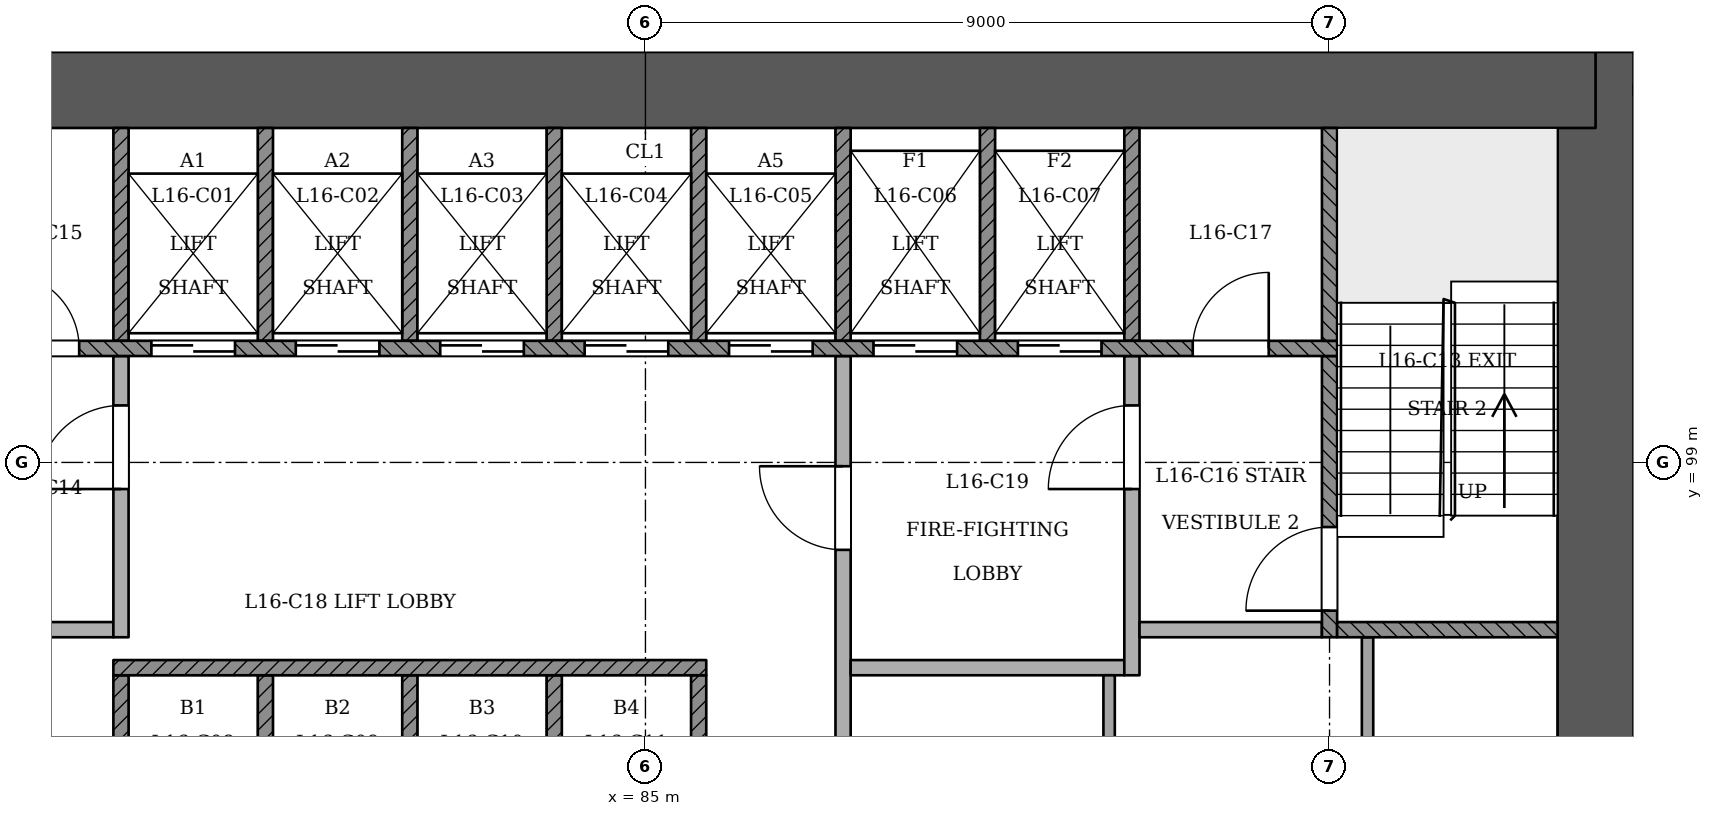
"""IFC4 building model, lengths in metres.
Left out: names, types, materials, properties, quantities, classifications, styles, units other than length and angle.
Written with IfcOpenShell. Run it as: python <this file> out.ifc"""

import sys

from ifc_helpers import new_model, si_unit, direction, frame, frame_2d, origin, place, context, subcontext, project, spatial, rectangle, extrude, element, fill, save


model = new_model("IFC4")
c1 = context("Model", 3, precision=1e-05, world=origin(), true_north=direction((0.0, 1.0)))
c2 = subcontext(c1, "Body", "Model", "MODEL_VIEW")
j1 = project(units=[si_unit("LENGTHUNIT", "METRE"), si_unit("PLANEANGLEUNIT", "RADIAN")], contexts=[c1])
p1 = place(None, origin())
s1 = spatial("IfcSite", under=j1, at=p1, CompositionType="ELEMENT")
p2 = place(p1, origin())
s2 = spatial("IfcBuilding", under=s1, at=p2, CompositionType="ELEMENT")
p3 = place(p2, frame((0.0, 0.0, 66.6)))
s3 = spatial("IfcBuildingStorey", under=s2, at=p3, CompositionType="ELEMENT", Elevation=66.6)
p4 = place(p3, frame((97.5, 92.9, 0.0), z_axis=(0.0, 0.0, 1.0), x_axis=(0.0, 1.0, 0.0)))
e1 = element("IfcWall", 1, at=p4, inside=s3, PredefinedType="SHEAR", context=c2, shape_type="SweptSolid", body=[
    extrude(rectangle(XDim=11.5, YDim=1.0, at=frame_2d((5.75, 0.0))), origin(), (0.0, 0.0, 1.0), 3.6),
])
p5 = place(p3, frame((97.5, 103.9, 0.0), z_axis=(0.0, 0.0, 1.0), x_axis=(-1.0, 0.0, 0.0)))
e2 = element("IfcWall", 2, at=p5, inside=s3, PredefinedType="SHEAR", context=c2, shape_type="SweptSolid", body=[
    extrude(rectangle(XDim=25.5, YDim=1.0, at=frame_2d((12.75, 0.0))), origin(), (0.0, 0.0, 1.0), 3.6),
])
p6 = place(p3, frame((62.458, 97.093, 0.0), z_axis=(0.0, 0.0, 1.0), x_axis=(0.499998802074, -0.866026095406, 0.0)))
e3 = element("IfcWall", 3, at=p6, inside=s3, PredefinedType="PARTITIONING", context=c2, shape_type="SweptSolid", body=[
    extrude(rectangle(XDim=43.437, YDim=0.15, at=frame_2d((21.719, 0.0))), origin(), (0.0, 0.0, 1.0), 2.7),
])
p7 = place(p6, frame((0.286, 0.0, 0.0)))
e4 = element("IfcOpeningElement", 4, at=p7, cuts=e3, PredefinedType="OPENING", context=c2, shape_type="SweptSolid", body=[
    extrude(rectangle(XDim=1.2, YDim=2.1, at=frame_2d((0.6, 1.05))), frame((0.0, 0.085, 0.0), z_axis=(0.0, -1.0, 0.0), x_axis=(1.0, 0.0, 0.0)), (0.0, 0.0, 1.0), 0.171),
])
p8 = place(p6, frame((12.13, 0.0, 0.0)))
e5 = element("IfcOpeningElement", 5, at=p8, cuts=e3, PredefinedType="OPENING", context=c2, shape_type="SweptSolid", body=[
    extrude(rectangle(XDim=1.2, YDim=2.1, at=frame_2d((0.6, 1.05))), frame((0.0, 0.085, 0.0), z_axis=(0.0, -1.0, 0.0), x_axis=(1.0, 0.0, 0.0)), (0.0, 0.0, 1.0), 0.171),
])
p9 = place(p6, frame((18.98, 0.0, 0.0)))
e6 = element("IfcOpeningElement", 6, at=p9, cuts=e3, PredefinedType="OPENING", context=c2, shape_type="SweptSolid", body=[
    extrude(rectangle(XDim=1.0, YDim=2.1, at=frame_2d((0.5, 1.05))), frame((0.0, 0.085, 0.0), z_axis=(0.0, -1.0, 0.0), x_axis=(1.0, 0.0, 0.0)), (0.0, 0.0, 1.0), 0.171),
])
p10 = place(p6, frame((27.88, 0.0, 0.0)))
e7 = element("IfcOpeningElement", 7, at=p10, cuts=e3, PredefinedType="OPENING", context=c2, shape_type="SweptSolid", body=[
    extrude(rectangle(XDim=1.2, YDim=2.1, at=frame_2d((0.6, 1.05))), frame((0.0, 0.085, 0.0), z_axis=(0.0, -1.0, 0.0), x_axis=(1.0, 0.0, 0.0)), (0.0, 0.0, 1.0), 0.171),
])
p11 = place(p6, frame((38.745, 0.0, 0.0)))
e8 = element("IfcOpeningElement", 8, at=p11, cuts=e3, PredefinedType="OPENING", context=c2, shape_type="SweptSolid", body=[
    extrude(rectangle(XDim=1.2, YDim=2.1, at=frame_2d((0.6, 1.05))), frame((0.0, 0.085, 0.0), z_axis=(0.0, -1.0, 0.0), x_axis=(1.0, 0.0, 0.0)), (0.0, 0.0, 1.0), 0.171),
])
p12 = place(p3, frame((85.824, 59.475, 0.0), z_axis=(0.0, 0.0, 1.0), x_axis=(0.499998498473, 0.86602627069, 0.0)))
e9 = element("IfcWall", 9, at=p12, inside=s3, PredefinedType="PARTITIONING", context=c2, shape_type="SweptSolid", body=[
    extrude(rectangle(XDim=42.924, YDim=0.15, at=frame_2d((21.462, 0.0))), origin(), (0.0, 0.0, 1.0), 2.7),
])
p13 = place(p12, frame((3.492, 0.0, 0.0)))
e10 = element("IfcOpeningElement", 10, at=p13, cuts=e9, PredefinedType="OPENING", context=c2, shape_type="SweptSolid", body=[
    extrude(rectangle(XDim=1.2, YDim=2.1, at=frame_2d((0.6, 1.05))), frame((0.0, 0.085, 0.0), z_axis=(0.0, -1.0, 0.0), x_axis=(1.0, 0.0, 0.0)), (0.0, 0.0, 1.0), 0.171),
])
p14 = place(p12, frame((14.357, 0.0, 0.0)))
e11 = element("IfcOpeningElement", 11, at=p14, cuts=e9, PredefinedType="OPENING", context=c2, shape_type="SweptSolid", body=[
    extrude(rectangle(XDim=1.2, YDim=2.1, at=frame_2d((0.6, 1.05))), frame((0.0, 0.085, 0.0), z_axis=(0.0, -1.0, 0.0), x_axis=(1.0, 0.0, 0.0)), (0.0, 0.0, 1.0), 0.171),
])
p15 = place(p12, frame((27.857, 0.0, 0.0)))
e12 = element("IfcOpeningElement", 12, at=p15, cuts=e9, PredefinedType="OPENING", context=c2, shape_type="SweptSolid", body=[
    extrude(rectangle(XDim=1.2, YDim=2.1, at=frame_2d((0.6, 1.05))), frame((0.0, 0.085, 0.0), z_axis=(0.0, -1.0, 0.0), x_axis=(1.0, 0.0, 0.0)), (0.0, 0.0, 1.0), 0.171),
])
p16 = place(p12, frame((38.721, 0.0, 0.0)))
e13 = element("IfcOpeningElement", 13, at=p16, cuts=e9, PredefinedType="OPENING", context=c2, shape_type="SweptSolid", body=[
    extrude(rectangle(XDim=1.2, YDim=2.1, at=frame_2d((0.6, 1.05))), frame((0.0, 0.085, 0.0), z_axis=(0.0, -1.0, 0.0), x_axis=(1.0, 0.0, 0.0)), (0.0, 0.0, 1.0), 0.171),
])
for number, where, z_axis, x_axis in (
    (14, (78.1, 93.4, 0.0), (0.0, 0.0, 1.0), (0.0, 1.0, 0.0)),
    (15, (80.0, 93.4, 0.0), (0.0, 0.0, 1.0), (0.0, 1.0, 0.0)),
    (16, (81.9, 93.4, 0.0), (0.0, 0.0, 1.0), (0.0, 1.0, 0.0)),
    (17, (83.8, 93.4, 0.0), (0.0, 0.0, 1.0), (0.0, 1.0, 0.0)),
    (18, (85.7, 93.4, 0.0), (0.0, 0.0, 1.0), (0.0, 1.0, 0.0)),
):
    element("IfcWall", number, at=place(p3, frame(where, z_axis=z_axis, x_axis=x_axis)), inside=s3, PredefinedType="SOLIDWALL", context=c2, shape_type="SweptSolid", body=[
        extrude(rectangle(XDim=2.8, YDim=0.2, at=frame_2d((1.4, 0.0))), origin(), (0.0, 0.0, 1.0), 3.1),
    ])
p17 = place(p3, frame((87.6, 93.4, 0.0), z_axis=(0.0, 0.0, 1.0), x_axis=(0.0, 1.0, 0.0)))
e19 = element("IfcWall", 19, at=p17, inside=s3, PredefinedType="PARTITIONING", context=c2, shape_type="SweptSolid", body=[
    extrude(rectangle(XDim=7.0, YDim=0.2, at=frame_2d((3.5, 0.0))), origin(), (0.0, 0.0, 1.0), 3.1),
])
p18 = place(p17, frame((4.45, 0.0, 0.0)))
e20 = element("IfcOpeningElement", 20, at=p18, cuts=e19, PredefinedType="OPENING", context=c2, shape_type="SweptSolid", body=[
    extrude(rectangle(XDim=1.1, YDim=2.1, at=frame_2d((0.55, 1.05))), frame((0.0, 0.11, 0.0), z_axis=(0.0, -1.0, 0.0), x_axis=(1.0, 0.0, 0.0)), (0.0, 0.0, 1.0), 0.221),
])
p19 = place(p3, frame((91.1, 93.4, 0.0), z_axis=(0.0, 0.0, 1.0), x_axis=(0.0, 1.0, 0.0)))
e21 = element("IfcWall", 21, at=p19, inside=s3, PredefinedType="PARTITIONING", context=c2, shape_type="SweptSolid", body=[
    extrude(rectangle(XDim=2.8, YDim=0.15, at=frame_2d((1.4, 0.0))), origin(), (0.0, 0.0, 1.0), 3.1),
])
p20 = place(p3, frame((94.5, 93.4, 0.0), z_axis=(0.0, 0.0, 1.0), x_axis=(0.0, 1.0, 0.0)))
e22 = element("IfcWall", 22, at=p20, inside=s3, PredefinedType="PARTITIONING", context=c2, shape_type="SweptSolid", body=[
    extrude(rectangle(XDim=3.3, YDim=0.15, at=frame_2d((1.65, 0.0))), origin(), (0.0, 0.0, 1.0), 3.1),
])
p21 = place(p3, frame((78.0, 96.3, 0.0), z_axis=(0.0, 0.0, 1.0), x_axis=(1.0, 0.0, 0.0)))
e23 = element("IfcWall", 23, at=p21, inside=s3, PredefinedType="SOLIDWALL", context=c2, shape_type="SweptSolid", body=[
    extrude(rectangle(XDim=7.8, YDim=0.2, at=frame_2d((3.9, 0.0))), origin(), (0.0, 0.0, 1.0), 3.1),
])
p22 = place(p3, frame((87.7, 96.3, 0.0), z_axis=(0.0, 0.0, 1.0), x_axis=(1.0, 0.0, 0.0)))
e24 = element("IfcWall", 24, at=p22, inside=s3, PredefinedType="PARTITIONING", context=c2, shape_type="SweptSolid", body=[
    extrude(rectangle(XDim=3.6, YDim=0.2, at=frame_2d((1.8, 0.0))), origin(), (0.0, 0.0, 1.0), 3.1),
])
p23 = place(p3, frame((91.4, 96.2, 0.0), z_axis=(0.0, 0.0, 1.0), x_axis=(0.0, 1.0, 0.0)))
e25 = element("IfcWall", 25, at=p23, inside=s3, PredefinedType="PARTITIONING", context=c2, shape_type="SweptSolid", body=[
    extrude(rectangle(XDim=4.2, YDim=0.2, at=frame_2d((2.1, 0.0))), origin(), (0.0, 0.0, 1.0), 3.1),
])
p24 = place(p23, frame((2.45, 0.0, 0.0)))
e26 = element("IfcOpeningElement", 26, at=p24, cuts=e25, PredefinedType="OPENING", context=c2, shape_type="SweptSolid", body=[
    extrude(rectangle(XDim=1.1, YDim=2.1, at=frame_2d((0.55, 1.05))), frame((0.0, 0.11, 0.0), z_axis=(0.0, -1.0, 0.0), x_axis=(1.0, 0.0, 0.0)), (0.0, 0.0, 1.0), 0.221),
])
p25 = place(p3, frame((76.1, 96.8, 0.0), z_axis=(0.0, 0.0, 1.0), x_axis=(1.0, 0.0, 0.0)))
e27 = element("IfcWall", 27, at=p25, inside=s3, PredefinedType="PARTITIONING", context=c2, shape_type="SweptSolid", body=[
    extrude(rectangle(XDim=1.9, YDim=0.2, at=frame_2d((0.95, 0.0))), origin(), (0.0, 0.0, 1.0), 3.1),
])
p26 = place(p3, frame((78.1, 96.7, 0.0), z_axis=(0.0, 0.0, 1.0), x_axis=(0.0, 1.0, 0.0)))
e28 = element("IfcWall", 28, at=p26, inside=s3, PredefinedType="PARTITIONING", context=c2, shape_type="SweptSolid", body=[
    extrude(rectangle(XDim=3.7, YDim=0.2, at=frame_2d((1.85, 0.0))), origin(), (0.0, 0.0, 1.0), 3.1),
])
p27 = place(p26, frame((1.95, 0.0, 0.0)))
e29 = element("IfcOpeningElement", 29, at=p27, cuts=e28, PredefinedType="OPENING", context=c2, shape_type="SweptSolid", body=[
    extrude(rectangle(XDim=1.1, YDim=2.1, at=frame_2d((0.55, 1.05))), frame((0.0, 0.11, 0.0), z_axis=(0.0, -1.0, 0.0), x_axis=(1.0, 0.0, 0.0)), (0.0, 0.0, 1.0), 0.221),
])
p28 = place(p3, frame((91.5, 96.8, 0.0), z_axis=(0.0, 0.0, 1.0), x_axis=(1.0, 0.0, 0.0)))
e30 = element("IfcWall", 30, at=p28, inside=s3, PredefinedType="PARTITIONING", context=c2, shape_type="SweptSolid", body=[
    extrude(rectangle(XDim=2.4, YDim=0.2, at=frame_2d((1.2, 0.0))), origin(), (0.0, 0.0, 1.0), 3.1),
])
p29 = place(p3, frame((94.0, 96.7, 0.0), z_axis=(0.0, 0.0, 1.0), x_axis=(0.0, 1.0, 0.0)))
e31 = element("IfcWall", 31, at=p29, inside=s3, PredefinedType="SOLIDWALL", context=c2, shape_type="SweptSolid", body=[
    extrude(rectangle(XDim=3.7, YDim=0.2, at=frame_2d((1.85, 0.0))), origin(), (0.0, 0.0, 1.0), 3.1),
])
p30 = place(p29, frame((0.35, 0.0, 0.0)))
e32 = element("IfcOpeningElement", 32, at=p30, cuts=e31, PredefinedType="OPENING", context=c2, shape_type="SweptSolid", body=[
    extrude(rectangle(XDim=1.1, YDim=2.1, at=frame_2d((0.55, 1.05))), frame((0.0, 0.11, 0.0), z_axis=(0.0, -1.0, 0.0), x_axis=(1.0, 0.0, 0.0)), (0.0, 0.0, 1.0), 0.221),
])
p31 = place(p3, frame((94.1, 96.8, 0.0), z_axis=(0.0, 0.0, 1.0), x_axis=(1.0, 0.0, 0.0)))
e33 = element("IfcWall", 33, at=p31, inside=s3, PredefinedType="SOLIDWALL", context=c2, shape_type="SweptSolid", body=[
    extrude(rectangle(XDim=2.9, YDim=0.2, at=frame_2d((1.45, 0.0))), origin(), (0.0, 0.0, 1.0), 3.1),
])
p32 = place(p3, frame((75.9, 100.5, 0.0), z_axis=(0.0, 0.0, 1.0), x_axis=(1.0, 0.0, 0.0)))
e34 = element("IfcWall", 34, at=p32, inside=s3, PredefinedType="SOLIDWALL", context=c2, shape_type="SweptSolid", body=[
    extrude(rectangle(XDim=18.2, YDim=0.2, at=frame_2d((9.1, 0.0))), origin(), (0.0, 0.0, 1.0), 3.1),
])
p33 = place(p32, frame((2.6, 0.0, 0.0)))
e35 = element("IfcOpeningElement", 35, at=p33, cuts=e34, PredefinedType="OPENING", context=c2, shape_type="SweptSolid", body=[
    extrude(rectangle(XDim=1.1, YDim=2.1, at=frame_2d((0.55, 1.05))), frame((0.0, 0.11, 0.0), z_axis=(0.0, -1.0, 0.0), x_axis=(1.0, 0.0, 0.0)), (0.0, 0.0, 1.0), 0.221),
])
p34 = place(p32, frame((4.5, 0.0, 0.0)))
e36 = element("IfcOpeningElement", 36, at=p34, cuts=e34, PredefinedType="OPENING", context=c2, shape_type="SweptSolid", body=[
    extrude(rectangle(XDim=1.1, YDim=2.1, at=frame_2d((0.55, 1.05))), frame((0.0, 0.11, 0.0), z_axis=(0.0, -1.0, 0.0), x_axis=(1.0, 0.0, 0.0)), (0.0, 0.0, 1.0), 0.221),
])
p35 = place(p32, frame((6.4, 0.0, 0.0)))
e37 = element("IfcOpeningElement", 37, at=p35, cuts=e34, PredefinedType="OPENING", context=c2, shape_type="SweptSolid", body=[
    extrude(rectangle(XDim=1.1, YDim=2.1, at=frame_2d((0.55, 1.05))), frame((0.0, 0.11, 0.0), z_axis=(0.0, -1.0, 0.0), x_axis=(1.0, 0.0, 0.0)), (0.0, 0.0, 1.0), 0.221),
])
p36 = place(p32, frame((8.3, 0.0, 0.0)))
e38 = element("IfcOpeningElement", 38, at=p36, cuts=e34, PredefinedType="OPENING", context=c2, shape_type="SweptSolid", body=[
    extrude(rectangle(XDim=1.1, YDim=2.1, at=frame_2d((0.55, 1.05))), frame((0.0, 0.11, 0.0), z_axis=(0.0, -1.0, 0.0), x_axis=(1.0, 0.0, 0.0)), (0.0, 0.0, 1.0), 0.221),
])
p37 = place(p32, frame((10.2, 0.0, 0.0)))
e39 = element("IfcOpeningElement", 39, at=p37, cuts=e34, PredefinedType="OPENING", context=c2, shape_type="SweptSolid", body=[
    extrude(rectangle(XDim=1.1, YDim=2.1, at=frame_2d((0.55, 1.05))), frame((0.0, 0.11, 0.0), z_axis=(0.0, -1.0, 0.0), x_axis=(1.0, 0.0, 0.0)), (0.0, 0.0, 1.0), 0.221),
])
p38 = place(p32, frame((12.1, 0.0, 0.0)))
e40 = element("IfcOpeningElement", 40, at=p38, cuts=e34, PredefinedType="OPENING", context=c2, shape_type="SweptSolid", body=[
    extrude(rectangle(XDim=1.1, YDim=2.1, at=frame_2d((0.55, 1.05))), frame((0.0, 0.11, 0.0), z_axis=(0.0, -1.0, 0.0), x_axis=(1.0, 0.0, 0.0)), (0.0, 0.0, 1.0), 0.221),
])
p39 = place(p32, frame((14.0, 0.0, 0.0)))
e41 = element("IfcOpeningElement", 41, at=p39, cuts=e34, PredefinedType="OPENING", context=c2, shape_type="SweptSolid", body=[
    extrude(rectangle(XDim=1.1, YDim=2.1, at=frame_2d((0.55, 1.05))), frame((0.0, 0.11, 0.0), z_axis=(0.0, -1.0, 0.0), x_axis=(1.0, 0.0, 0.0)), (0.0, 0.0, 1.0), 0.221),
])
p40 = place(p32, frame((0.65, 0.0, 0.0)))
e42 = element("IfcOpeningElement", 42, at=p40, cuts=e34, PredefinedType="OPENING", context=c2, shape_type="SweptSolid", body=[
    extrude(rectangle(XDim=1.0, YDim=2.1, at=frame_2d((0.5, 1.05))), frame((0.0, 0.11, 0.0), z_axis=(0.0, -1.0, 0.0), x_axis=(1.0, 0.0, 0.0)), (0.0, 0.0, 1.0), 0.221),
])
p41 = place(p32, frame((16.3, 0.0, 0.0)))
e43 = element("IfcOpeningElement", 43, at=p41, cuts=e34, PredefinedType="OPENING", context=c2, shape_type="SweptSolid", body=[
    extrude(rectangle(XDim=1.0, YDim=2.1, at=frame_2d((0.5, 1.05))), frame((0.0, 0.11, 0.0), z_axis=(0.0, -1.0, 0.0), x_axis=(1.0, 0.0, 0.0)), (0.0, 0.0, 1.0), 0.221),
])
for number, where, z_axis, x_axis in (
    (44, (78.1, 100.6, 0.0), (0.0, 0.0, 1.0), (0.0, 1.0, 0.0)),
    (45, (80.0, 100.6, 0.0), (0.0, 0.0, 1.0), (0.0, 1.0, 0.0)),
    (46, (81.9, 100.6, 0.0), (0.0, 0.0, 1.0), (0.0, 1.0, 0.0)),
    (47, (83.8, 100.6, 0.0), (0.0, 0.0, 1.0), (0.0, 1.0, 0.0)),
    (48, (85.7, 100.6, 0.0), (0.0, 0.0, 1.0), (0.0, 1.0, 0.0)),
    (49, (87.6, 100.6, 0.0), (0.0, 0.0, 1.0), (0.0, 1.0, 0.0)),
    (50, (89.5, 100.6, 0.0), (0.0, 0.0, 1.0), (0.0, 1.0, 0.0)),
    (51, (91.4, 100.6, 0.0), (0.0, 0.0, 1.0), (0.0, 1.0, 0.0)),
    (52, (94.0, 100.6, 0.0), (0.0, 0.0, 1.0), (0.0, 1.0, 0.0)),
):
    element("IfcWall", number, at=place(p3, frame(where, z_axis=z_axis, x_axis=x_axis)), inside=s3, PredefinedType="SOLIDWALL", context=c2, shape_type="SweptSolid", body=[
        extrude(rectangle(XDim=2.8, YDim=0.2, at=frame_2d((1.4, 0.0))), origin(), (0.0, 0.0, 1.0), 3.1),
    ])
p42 = place(p33, origin())
e53 = element("IfcDoor", 53, at=p42, inside=s3, OperationType="SLIDING_TO_RIGHT", PredefinedType="NOTDEFINED", context=c2, shape_type="SweptSolid", body=[
    extrude(rectangle(XDim=1.1, YDim=2.1, at=frame_2d((0.55, 1.05))), frame((0.0, 0.025, 0.0), z_axis=(0.0, -1.0, 0.0), x_axis=(1.0, 0.0, 0.0)), (0.0, 0.0, 1.0), 0.05),
])
fill(e35, e53)
p43 = place(p34, origin())
e54 = element("IfcDoor", 54, at=p43, inside=s3, OperationType="SLIDING_TO_LEFT", PredefinedType="NOTDEFINED", context=c2, shape_type="SweptSolid", body=[
    extrude(rectangle(XDim=1.1, YDim=2.1, at=frame_2d((0.55, 1.05))), frame((0.0, 0.025, 0.0), z_axis=(0.0, -1.0, 0.0), x_axis=(1.0, 0.0, 0.0)), (0.0, 0.0, 1.0), 0.05),
])
fill(e36, e54)
p44 = place(p35, origin())
e55 = element("IfcDoor", 55, at=p44, inside=s3, OperationType="SLIDING_TO_RIGHT", PredefinedType="NOTDEFINED", context=c2, shape_type="SweptSolid", body=[
    extrude(rectangle(XDim=1.1, YDim=2.1, at=frame_2d((0.55, 1.05))), frame((0.0, 0.025, 0.0), z_axis=(0.0, -1.0, 0.0), x_axis=(1.0, 0.0, 0.0)), (0.0, 0.0, 1.0), 0.05),
])
fill(e37, e55)
p45 = place(p36, origin())
e56 = element("IfcDoor", 56, at=p45, inside=s3, OperationType="SLIDING_TO_LEFT", PredefinedType="NOTDEFINED", context=c2, shape_type="SweptSolid", body=[
    extrude(rectangle(XDim=1.1, YDim=2.1, at=frame_2d((0.55, 1.05))), frame((0.0, 0.025, 0.0), z_axis=(0.0, -1.0, 0.0), x_axis=(1.0, 0.0, 0.0)), (0.0, 0.0, 1.0), 0.05),
])
fill(e38, e56)
p46 = place(p37, origin())
e57 = element("IfcDoor", 57, at=p46, inside=s3, OperationType="SLIDING_TO_RIGHT", PredefinedType="NOTDEFINED", context=c2, shape_type="SweptSolid", body=[
    extrude(rectangle(XDim=1.1, YDim=2.1, at=frame_2d((0.55, 1.05))), frame((0.0, 0.025, 0.0), z_axis=(0.0, -1.0, 0.0), x_axis=(1.0, 0.0, 0.0)), (0.0, 0.0, 1.0), 0.05),
])
fill(e39, e57)
p47 = place(p38, origin())
e58 = element("IfcDoor", 58, at=p47, inside=s3, OperationType="SLIDING_TO_RIGHT", PredefinedType="NOTDEFINED", context=c2, shape_type="SweptSolid", body=[
    extrude(rectangle(XDim=1.1, YDim=2.1, at=frame_2d((0.55, 1.05))), frame((0.0, 0.025, 0.0), z_axis=(0.0, -1.0, 0.0), x_axis=(1.0, 0.0, 0.0)), (0.0, 0.0, 1.0), 0.05),
])
fill(e40, e58)
p48 = place(p39, origin())
e59 = element("IfcDoor", 59, at=p48, inside=s3, OperationType="SLIDING_TO_LEFT", PredefinedType="NOTDEFINED", context=c2, shape_type="SweptSolid", body=[
    extrude(rectangle(XDim=1.1, YDim=2.1, at=frame_2d((0.55, 1.05))), frame((0.0, 0.025, 0.0), z_axis=(0.0, -1.0, 0.0), x_axis=(1.0, 0.0, 0.0)), (0.0, 0.0, 1.0), 0.05),
])
fill(e41, e59)
p49 = place(p30, origin())
e60 = element("IfcDoor", 60, at=p49, inside=s3, OperationType="SINGLE_SWING_LEFT", PredefinedType="NOTDEFINED", context=c2, shape_type="SweptSolid", body=[
    extrude(rectangle(XDim=1.1, YDim=2.1, at=frame_2d((0.55, 1.05))), frame((0.0, 0.025, 0.0), z_axis=(0.0, -1.0, 0.0), x_axis=(1.0, 0.0, 0.0)), (0.0, 0.0, 1.0), 0.05),
])
fill(e32, e60)
p50 = place(p27, origin())
e61 = element("IfcDoor", 61, at=p50, inside=s3, OperationType="SINGLE_SWING_LEFT", PredefinedType="NOTDEFINED", context=c2, shape_type="SweptSolid", body=[
    extrude(rectangle(XDim=1.1, YDim=2.1, at=frame_2d((0.55, 1.05))), frame((0.0, 0.025, 0.0), z_axis=(0.0, -1.0, 0.0), x_axis=(1.0, 0.0, 0.0)), (0.0, 0.0, 1.0), 0.05),
])
fill(e29, e61)
p51 = place(p18, origin())
e62 = element("IfcDoor", 62, at=p51, inside=s3, OperationType="SINGLE_SWING_RIGHT", PredefinedType="NOTDEFINED", context=c2, shape_type="SweptSolid", body=[
    extrude(rectangle(XDim=1.1, YDim=2.1, at=frame_2d((0.55, 1.05))), frame((0.0, 0.025, 0.0), z_axis=(0.0, -1.0, 0.0), x_axis=(1.0, 0.0, 0.0)), (0.0, 0.0, 1.0), 0.05),
])
fill(e20, e62)
p52 = place(p24, origin())
e63 = element("IfcDoor", 63, at=p52, inside=s3, OperationType="SINGLE_SWING_LEFT", PredefinedType="NOTDEFINED", context=c2, shape_type="SweptSolid", body=[
    extrude(rectangle(XDim=1.1, YDim=2.1, at=frame_2d((0.55, 1.05))), frame((0.0, 0.025, 0.0), z_axis=(0.0, -1.0, 0.0), x_axis=(1.0, 0.0, 0.0)), (0.0, 0.0, 1.0), 0.05),
])
fill(e26, e63)
p53 = place(p40, origin())
e64 = element("IfcDoor", 64, at=p53, inside=s3, OperationType="SINGLE_SWING_LEFT", PredefinedType="NOTDEFINED", context=c2, shape_type="SweptSolid", body=[
    extrude(rectangle(XDim=1.0, YDim=2.1, at=frame_2d((0.5, 1.05))), frame((0.0, 0.025, 0.0), z_axis=(0.0, -1.0, 0.0), x_axis=(1.0, 0.0, 0.0)), (0.0, 0.0, 1.0), 0.05),
])
fill(e42, e64)
p54 = place(p41, origin())
e65 = element("IfcDoor", 65, at=p54, inside=s3, OperationType="SINGLE_SWING_RIGHT", PredefinedType="NOTDEFINED", context=c2, shape_type="SweptSolid", body=[
    extrude(rectangle(XDim=1.0, YDim=2.1, at=frame_2d((0.5, 1.05))), frame((0.0, 0.025, 0.0), z_axis=(0.0, -1.0, 0.0), x_axis=(1.0, 0.0, 0.0)), (0.0, 0.0, 1.0), 0.05),
])
fill(e43, e65)
save(model, sys.argv[1])
